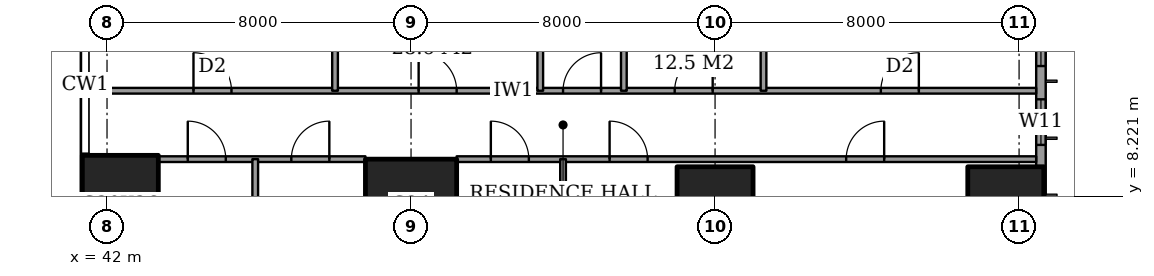
"""IFC4 building model, lengths in metres.
Left out: names, types, materials, properties, quantities, classifications, styles, units other than length and angle.
Written with IfcOpenShell. Run it as: python <this file> out.ifc"""

import sys

from ifc_helpers import new_model, si_unit, direction, frame, frame_2d, origin, origin_2d, place, context, subcontext, project, spatial, rectangle, extrude, element, fill, save


model = new_model("IFC4")
c1 = context("Model", 3, precision=1e-05, world=origin(), true_north=direction((0.0, 1.0)))
c2 = subcontext(c1, "Body", "Model", "MODEL_VIEW")
j1 = project(units=[si_unit("LENGTHUNIT", "METRE"), si_unit("PLANEANGLEUNIT", "RADIAN")], contexts=[c1])
p1 = place(None, origin())
s1 = spatial("IfcSite", under=j1, at=p1, CompositionType="ELEMENT")
p2 = place(p1, origin())
s2 = spatial("IfcBuilding", under=s1, at=p2, CompositionType="ELEMENT")
p3 = place(p2, frame((0.0, 0.0, 121.4)))
s3 = spatial("IfcBuildingStorey", under=s2, at=p3, CompositionType="ELEMENT", Elevation=121.4)
p4 = place(p3, frame((42.35, 8.0, 0.0), z_axis=(0.0, 0.0, 1.0), x_axis=(1.0, 0.0, 0.0)))
e1 = element("IfcColumn", 1, at=p4, inside=s3, PredefinedType="COLUMN", context=c2, shape_type="SweptSolid", body=[
    extrude(rectangle(XDim=2.0, YDim=2.6, at=origin_2d()), origin(), (0.0, 0.0, 1.0), 3.6),
])
p5 = place(p3, frame((50.0, 8.0, 0.0), z_axis=(0.0, 0.0, 1.0), x_axis=(1.0, 0.0, 0.0)))
e2 = element("IfcColumn", 2, at=p5, inside=s3, PredefinedType="COLUMN", context=c2, shape_type="SweptSolid", body=[
    extrude(rectangle(XDim=2.4, YDim=2.4, at=origin_2d()), origin(), (0.0, 0.0, 1.0), 3.6),
])
for number, where, z_axis, x_axis in (
    (3, (58.0, 8.0, 0.0), (0.0, 0.0, 1.0), (1.0, 0.0, 0.0)),
    (4, (65.65, 8.0, 0.0), (0.0, 0.0, 1.0), (1.0, 0.0, 0.0)),
):
    element("IfcColumn", number, at=place(p3, frame(where, z_axis=z_axis, x_axis=x_axis)), inside=s3, PredefinedType="COLUMN", context=c2, shape_type="SweptSolid", body=[
        extrude(rectangle(XDim=2.0, YDim=2.0, at=origin_2d()), origin(), (0.0, 0.0, 1.0), 3.6),
    ])
p6 = place(p3, frame((66.575, 3.175, 0.0), z_axis=(0.0, 0.0, 1.0), x_axis=(0.0, 1.0, 0.0)))
e5 = element("IfcWall", 5, at=p6, inside=s3, PredefinedType="SOLIDWALL", context=c2, shape_type="SweptSolid", body=[
    extrude(rectangle(XDim=41.65, YDim=0.25, at=frame_2d((20.825, 0.0))), origin(), (0.0, 0.0, 1.0), 3.6),
])
p7 = place(p6, frame((0.775, 0.0, 0.4)))
e6 = element("IfcOpeningElement", 6, at=p7, cuts=e5, PredefinedType="OPENING", context=c2, shape_type="SweptSolid", body=[
    extrude(rectangle(XDim=2.4, YDim=2.2, at=frame_2d((1.2, 1.1))), frame((0.0, 0.135, 0.0), z_axis=(0.0, -1.0, 0.0), x_axis=(1.0, 0.0, 0.0)), (0.0, 0.0, 1.0), 0.27),
])
p8 = place(p6, frame((6.4, 0.0, 0.4)))
e7 = element("IfcOpeningElement", 7, at=p8, cuts=e5, PredefinedType="OPENING", context=c2, shape_type="SweptSolid", body=[
    extrude(rectangle(XDim=1.2, YDim=2.2, at=frame_2d((0.6, 1.1))), frame((0.0, 0.135, 0.0), z_axis=(0.0, -1.0, 0.0), x_axis=(1.0, 0.0, 0.0)), (0.0, 0.0, 1.0), 0.27),
])
p9 = place(p6, frame((8.475, 0.0, 0.4)))
e8 = element("IfcOpeningElement", 8, at=p9, cuts=e5, PredefinedType="OPENING", context=c2, shape_type="SweptSolid", body=[
    extrude(rectangle(XDim=2.4, YDim=2.2, at=frame_2d((1.2, 1.1))), frame((0.0, 0.135, 0.0), z_axis=(0.0, -1.0, 0.0), x_axis=(1.0, 0.0, 0.0)), (0.0, 0.0, 1.0), 0.27),
])
p10 = place(p6, frame((15.775, 0.0, 0.4)))
e9 = element("IfcOpeningElement", 9, at=p10, cuts=e5, PredefinedType="OPENING", context=c2, shape_type="SweptSolid", body=[
    extrude(rectangle(XDim=2.4, YDim=2.2, at=frame_2d((1.2, 1.1))), frame((0.0, 0.135, 0.0), z_axis=(0.0, -1.0, 0.0), x_axis=(1.0, 0.0, 0.0)), (0.0, 0.0, 1.0), 0.27),
])
p11 = place(p6, frame((23.475, 0.0, 0.4)))
e10 = element("IfcOpeningElement", 10, at=p11, cuts=e5, PredefinedType="OPENING", context=c2, shape_type="SweptSolid", body=[
    extrude(rectangle(XDim=2.4, YDim=2.2, at=frame_2d((1.2, 1.1))), frame((0.0, 0.135, 0.0), z_axis=(0.0, -1.0, 0.0), x_axis=(1.0, 0.0, 0.0)), (0.0, 0.0, 1.0), 0.27),
])
p12 = place(p6, frame((30.975, 0.0, 0.4)))
e11 = element("IfcOpeningElement", 11, at=p12, cuts=e5, PredefinedType="OPENING", context=c2, shape_type="SweptSolid", body=[
    extrude(rectangle(XDim=2.4, YDim=2.2, at=frame_2d((1.2, 1.1))), frame((0.0, 0.135, 0.0), z_axis=(0.0, -1.0, 0.0), x_axis=(1.0, 0.0, 0.0)), (0.0, 0.0, 1.0), 0.27),
])
p13 = place(p6, frame((34.5, 0.0, 0.4)))
e12 = element("IfcOpeningElement", 12, at=p13, cuts=e5, PredefinedType="OPENING", context=c2, shape_type="SweptSolid", body=[
    extrude(rectangle(XDim=1.2, YDim=2.2, at=frame_2d((0.6, 1.1))), frame((0.0, 0.135, 0.0), z_axis=(0.0, -1.0, 0.0), x_axis=(1.0, 0.0, 0.0)), (0.0, 0.0, 1.0), 0.27),
])
p14 = place(p6, frame((38.475, 0.0, 0.4)))
e13 = element("IfcOpeningElement", 13, at=p14, cuts=e5, PredefinedType="OPENING", context=c2, shape_type="SweptSolid", body=[
    extrude(rectangle(XDim=2.4, YDim=2.2, at=frame_2d((1.2, 1.1))), frame((0.0, 0.135, 0.0), z_axis=(0.0, -1.0, 0.0), x_axis=(1.0, 0.0, 0.0)), (0.0, 0.0, 1.0), 0.27),
])
p15 = place(p3, frame((43.35, 9.2, 0.0), z_axis=(0.0, 0.0, 1.0), x_axis=(1.0, 0.0, 0.0)))
e14 = element("IfcWall", 14, at=p15, inside=s3, PredefinedType="PARTITIONING", context=c2, shape_type="SweptSolid", body=[
    extrude(rectangle(XDim=5.45, YDim=0.15, at=frame_2d((2.725, 0.0))), origin(), (0.0, 0.0, 1.0), 3.35),
])
p16 = place(p15, frame((3.5, 0.0, 0.0)))
e15 = element("IfcOpeningElement", 15, at=p16, cuts=e14, PredefinedType="OPENING", context=c2, shape_type="SweptSolid", body=[
    extrude(rectangle(XDim=1.0, YDim=2.1, at=frame_2d((0.5, 1.05))), frame((0.0, 0.085, 0.0), z_axis=(0.0, -1.0, 0.0), x_axis=(1.0, 0.0, 0.0)), (0.0, 0.0, 1.0), 0.17),
])
p17 = place(p15, frame((0.775, 0.0, 0.0)))
e16 = element("IfcOpeningElement", 16, at=p17, cuts=e14, PredefinedType="OPENING", context=c2, shape_type="SweptSolid", body=[
    extrude(rectangle(XDim=1.0, YDim=2.1, at=frame_2d((0.5, 1.05))), frame((0.0, 0.085, 0.0), z_axis=(0.0, -1.0, 0.0), x_axis=(1.0, 0.0, 0.0)), (0.0, 0.0, 1.0), 0.17),
])
p18 = place(p3, frame((51.2, 9.2, 0.0), z_axis=(0.0, 0.0, 1.0), x_axis=(1.0, 0.0, 0.0)))
e17 = element("IfcWall", 17, at=p18, inside=s3, PredefinedType="PARTITIONING", context=c2, shape_type="SweptSolid", body=[
    extrude(rectangle(XDim=15.25, YDim=0.15, at=frame_2d((7.625, 0.0))), origin(), (0.0, 0.0, 1.0), 3.35),
])
p19 = place(p18, frame((10.25, 0.0, 0.0)))
e18 = element("IfcOpeningElement", 18, at=p19, cuts=e17, PredefinedType="OPENING", context=c2, shape_type="SweptSolid", body=[
    extrude(rectangle(XDim=1.0, YDim=2.1, at=frame_2d((0.5, 1.05))), frame((0.0, 0.085, 0.0), z_axis=(0.0, -1.0, 0.0), x_axis=(1.0, 0.0, 0.0)), (0.0, 0.0, 1.0), 0.17),
])
p20 = place(p18, frame((4.025, 0.0, 0.0)))
e19 = element("IfcOpeningElement", 19, at=p20, cuts=e17, PredefinedType="OPENING", context=c2, shape_type="SweptSolid", body=[
    extrude(rectangle(XDim=1.0, YDim=2.1, at=frame_2d((0.5, 1.05))), frame((0.0, 0.085, 0.0), z_axis=(0.0, -1.0, 0.0), x_axis=(1.0, 0.0, 0.0)), (0.0, 0.0, 1.0), 0.17),
])
p21 = place(p18, frame((0.9, 0.0, 0.0)))
e20 = element("IfcOpeningElement", 20, at=p21, cuts=e17, PredefinedType="OPENING", context=c2, shape_type="SweptSolid", body=[
    extrude(rectangle(XDim=1.0, YDim=2.1, at=frame_2d((0.5, 1.05))), frame((0.0, 0.085, 0.0), z_axis=(0.0, -1.0, 0.0), x_axis=(1.0, 0.0, 0.0)), (0.0, 0.0, 1.0), 0.17),
])
p22 = place(p3, frame((41.439, 11.0, 0.0), z_axis=(0.0, 0.0, 1.0), x_axis=(1.0, 0.0, 0.0)))
e21 = element("IfcWall", 21, at=p22, inside=s3, PredefinedType="PARTITIONING", context=c2, shape_type="SweptSolid", body=[
    extrude(rectangle(XDim=25.011, YDim=0.15, at=frame_2d((12.505, 0.0))), origin(), (0.0, 0.0, 1.0), 3.35),
])
p23 = place(p22, frame((12.561, 0.0, 0.0)))
e22 = element("IfcOpeningElement", 22, at=p23, cuts=e21, PredefinedType="OPENING", context=c2, shape_type="SweptSolid", body=[
    extrude(rectangle(XDim=1.0, YDim=2.1, at=frame_2d((0.5, 1.05))), frame((0.0, 0.085, 0.0), z_axis=(0.0, -1.0, 0.0), x_axis=(1.0, 0.0, 0.0)), (0.0, 0.0, 1.0), 0.17),
])
p24 = place(p22, frame((20.924, 0.0, 0.0)))
e23 = element("IfcOpeningElement", 23, at=p24, cuts=e21, PredefinedType="OPENING", context=c2, shape_type="SweptSolid", body=[
    extrude(rectangle(XDim=1.0, YDim=2.1, at=frame_2d((0.5, 1.05))), frame((0.0, 0.085, 0.0), z_axis=(0.0, -1.0, 0.0), x_axis=(1.0, 0.0, 0.0)), (0.0, 0.0, 1.0), 0.17),
])
p25 = place(p22, frame((15.499, 0.0, 0.0)))
e24 = element("IfcOpeningElement", 24, at=p25, cuts=e21, PredefinedType="OPENING", context=c2, shape_type="SweptSolid", body=[
    extrude(rectangle(XDim=1.0, YDim=2.1, at=frame_2d((0.5, 1.05))), frame((0.0, 0.085, 0.0), z_axis=(0.0, -1.0, 0.0), x_axis=(1.0, 0.0, 0.0)), (0.0, 0.0, 1.0), 0.17),
])
p26 = place(p22, frame((8.761, 0.0, 0.0)))
e25 = element("IfcOpeningElement", 25, at=p26, cuts=e21, PredefinedType="OPENING", context=c2, shape_type="SweptSolid", body=[
    extrude(rectangle(XDim=1.0, YDim=2.1, at=frame_2d((0.5, 1.05))), frame((0.0, 0.085, 0.0), z_axis=(0.0, -1.0, 0.0), x_axis=(1.0, 0.0, 0.0)), (0.0, 0.0, 1.0), 0.17),
])
p27 = place(p22, frame((2.836, 0.0, 0.0)))
e26 = element("IfcOpeningElement", 26, at=p27, cuts=e21, PredefinedType="OPENING", context=c2, shape_type="SweptSolid", body=[
    extrude(rectangle(XDim=1.0, YDim=2.1, at=frame_2d((0.5, 1.05))), frame((0.0, 0.085, 0.0), z_axis=(0.0, -1.0, 0.0), x_axis=(1.0, 0.0, 0.0)), (0.0, 0.0, 1.0), 0.17),
])
p28 = place(p3, frame((45.9, -0.45, 0.0), z_axis=(0.0, 0.0, 1.0), x_axis=(0.0, 1.0, 0.0)))
e27 = element("IfcWall", 27, at=p28, inside=s3, PredefinedType="PARTITIONING", context=c2, shape_type="SweptSolid", body=[
    extrude(rectangle(XDim=9.65, YDim=0.15, at=frame_2d((4.825, 0.0))), origin(), (0.0, 0.0, 1.0), 3.35),
])
for number, where, z_axis, x_axis in (
    (28, (48.0, 11.0, 0.0), (0.0, 0.0, 1.0), (0.0, 1.0, 0.0)),
    (29, (53.4, 11.0, 0.0), (0.0, 0.0, 1.0), (0.0, 1.0, 0.0)),
):
    element("IfcWall", number, at=place(p3, frame(where, z_axis=z_axis, x_axis=x_axis)), inside=s3, PredefinedType="PARTITIONING", context=c2, shape_type="SweptSolid", body=[
        extrude(rectangle(XDim=6.0, YDim=0.15, at=frame_2d((3.0, 0.0))), origin(), (0.0, 0.0, 1.0), 3.35),
    ])
p29 = place(p3, frame((54.0, -0.45, 0.0), z_axis=(0.0, 0.0, 1.0), x_axis=(0.0, 1.0, 0.0)))
e30 = element("IfcWall", 30, at=p29, inside=s3, PredefinedType="PARTITIONING", context=c2, shape_type="SweptSolid", body=[
    extrude(rectangle(XDim=9.65, YDim=0.15, at=frame_2d((4.825, 0.0))), origin(), (0.0, 0.0, 1.0), 3.35),
])
p30 = place(p3, frame((55.6, 11.0, 0.0), z_axis=(0.0, 0.0, 1.0), x_axis=(0.0, 1.0, 0.0)))
e31 = element("IfcWall", 31, at=p30, inside=s3, PredefinedType="PARTITIONING", context=c2, shape_type="SweptSolid", body=[
    extrude(rectangle(XDim=10.6, YDim=0.15, at=frame_2d((5.3, 0.0))), origin(), (0.0, 0.0, 1.0), 3.35),
])
p31 = place(p30, frame((7.8, 0.0, 0.0)))
e32 = element("IfcOpeningElement", 32, at=p31, cuts=e31, PredefinedType="OPENING", context=c2, shape_type="SweptSolid", body=[
    extrude(rectangle(XDim=1.0, YDim=2.1, at=frame_2d((0.5, 1.05))), frame((0.0, 0.085, 0.0), z_axis=(0.0, -1.0, 0.0), x_axis=(1.0, 0.0, 0.0)), (0.0, 0.0, 1.0), 0.17),
])
p32 = place(p3, frame((59.275, 11.0, 0.0), z_axis=(0.0, 0.0, 1.0), x_axis=(0.0, 1.0, 0.0)))
e33 = element("IfcWall", 33, at=p32, inside=s3, PredefinedType="PARTITIONING", context=c2, shape_type="SweptSolid", body=[
    extrude(rectangle(XDim=3.8, YDim=0.15, at=frame_2d((1.9, 0.0))), origin(), (0.0, 0.0, 1.0), 3.35),
])
p33 = place(p8, origin())
e34 = element("IfcWindow", 34, at=p33, inside=s3, PartitioningType="SINGLE_PANEL", PredefinedType="WINDOW", context=c2, shape_type="SweptSolid", body=[
    extrude(rectangle(XDim=1.2, YDim=2.2, at=frame_2d((0.6, 1.1))), frame((0.0, 0.03, 0.0), z_axis=(0.0, -1.0, 0.0), x_axis=(1.0, 0.0, 0.0)), (0.0, 0.0, 1.0), 0.06),
])
fill(e7, e34)
p34 = place(p9, origin())
e35 = element("IfcWindow", 35, at=p34, inside=s3, PartitioningType="SINGLE_PANEL", PredefinedType="WINDOW", context=c2, shape_type="SweptSolid", body=[
    extrude(rectangle(XDim=2.4, YDim=2.2, at=frame_2d((1.2, 1.1))), frame((0.0, 0.03, 0.0), z_axis=(0.0, -1.0, 0.0), x_axis=(1.0, 0.0, 0.0)), (0.0, 0.0, 1.0), 0.06),
])
fill(e8, e35)
p35 = place(p19, origin())
e36 = element("IfcDoor", 36, at=p35, inside=s3, OperationType="SINGLE_SWING_LEFT", PredefinedType="DOOR", context=c2, shape_type="SweptSolid", body=[
    extrude(rectangle(XDim=1.0, YDim=2.1, at=frame_2d((0.5, 1.05))), frame((0.0, 0.025, 0.0), z_axis=(0.0, -1.0, 0.0), x_axis=(1.0, 0.0, 0.0)), (0.0, 0.0, 1.0), 0.05),
])
fill(e18, e36)
p36 = place(p20, origin())
e37 = element("IfcDoor", 37, at=p36, inside=s3, OperationType="SINGLE_SWING_RIGHT", PredefinedType="DOOR", context=c2, shape_type="SweptSolid", body=[
    extrude(rectangle(XDim=1.0, YDim=2.1, at=frame_2d((0.5, 1.05))), frame((0.0, 0.025, 0.0), z_axis=(0.0, -1.0, 0.0), x_axis=(1.0, 0.0, 0.0)), (0.0, 0.0, 1.0), 0.05),
])
fill(e19, e37)
p37 = place(p21, origin())
e38 = element("IfcDoor", 38, at=p37, inside=s3, OperationType="SINGLE_SWING_RIGHT", PredefinedType="DOOR", context=c2, shape_type="SweptSolid", body=[
    extrude(rectangle(XDim=1.0, YDim=2.1, at=frame_2d((0.5, 1.05))), frame((0.0, 0.025, 0.0), z_axis=(0.0, -1.0, 0.0), x_axis=(1.0, 0.0, 0.0)), (0.0, 0.0, 1.0), 0.05),
])
fill(e20, e38)
p38 = place(p16, origin())
e39 = element("IfcDoor", 39, at=p38, inside=s3, OperationType="SINGLE_SWING_LEFT", PredefinedType="DOOR", context=c2, shape_type="SweptSolid", body=[
    extrude(rectangle(XDim=1.0, YDim=2.1, at=frame_2d((0.5, 1.05))), frame((0.0, 0.025, 0.0), z_axis=(0.0, -1.0, 0.0), x_axis=(1.0, 0.0, 0.0)), (0.0, 0.0, 1.0), 0.05),
])
fill(e15, e39)
p39 = place(p17, origin())
e40 = element("IfcDoor", 40, at=p39, inside=s3, OperationType="SINGLE_SWING_RIGHT", PredefinedType="DOOR", context=c2, shape_type="SweptSolid", body=[
    extrude(rectangle(XDim=1.0, YDim=2.1, at=frame_2d((0.5, 1.05))), frame((0.0, 0.025, 0.0), z_axis=(0.0, -1.0, 0.0), x_axis=(1.0, 0.0, 0.0)), (0.0, 0.0, 1.0), 0.05),
])
fill(e16, e40)
p40 = place(p23, origin())
e41 = element("IfcDoor", 41, at=p40, inside=s3, OperationType="SINGLE_SWING_LEFT", PredefinedType="DOOR", context=c2, shape_type="SweptSolid", body=[
    extrude(rectangle(XDim=1.0, YDim=2.1, at=frame_2d((0.5, 1.05))), frame((0.0, 0.025, 0.0), z_axis=(0.0, -1.0, 0.0), x_axis=(1.0, 0.0, 0.0)), (0.0, 0.0, 1.0), 0.05),
])
fill(e22, e41)
p41 = place(p24, origin())
e42 = element("IfcDoor", 42, at=p41, inside=s3, OperationType="SINGLE_SWING_LEFT", PredefinedType="DOOR", context=c2, shape_type="SweptSolid", body=[
    extrude(rectangle(XDim=1.0, YDim=2.1, at=frame_2d((0.5, 1.05))), frame((0.0, 0.025, 0.0), z_axis=(0.0, -1.0, 0.0), x_axis=(1.0, 0.0, 0.0)), (0.0, 0.0, 1.0), 0.05),
])
fill(e23, e42)
p42 = place(p25, origin())
e43 = element("IfcDoor", 43, at=p42, inside=s3, OperationType="SINGLE_SWING_LEFT", PredefinedType="DOOR", context=c2, shape_type="SweptSolid", body=[
    extrude(rectangle(XDim=1.0, YDim=2.1, at=frame_2d((0.5, 1.05))), frame((0.0, 0.025, 0.0), z_axis=(0.0, -1.0, 0.0), x_axis=(1.0, 0.0, 0.0)), (0.0, 0.0, 1.0), 0.05),
])
fill(e24, e43)
p43 = place(p26, origin())
e44 = element("IfcDoor", 44, at=p43, inside=s3, OperationType="SINGLE_SWING_RIGHT", PredefinedType="DOOR", context=c2, shape_type="SweptSolid", body=[
    extrude(rectangle(XDim=1.0, YDim=2.1, at=frame_2d((0.5, 1.05))), frame((0.0, 0.025, 0.0), z_axis=(0.0, -1.0, 0.0), x_axis=(1.0, 0.0, 0.0)), (0.0, 0.0, 1.0), 0.05),
])
fill(e25, e44)
p44 = place(p27, origin())
e45 = element("IfcDoor", 45, at=p44, inside=s3, OperationType="SINGLE_SWING_RIGHT", PredefinedType="DOOR", context=c2, shape_type="SweptSolid", body=[
    extrude(rectangle(XDim=1.0, YDim=2.1, at=frame_2d((0.5, 1.05))), frame((0.0, 0.025, 0.0), z_axis=(0.0, -1.0, 0.0), x_axis=(1.0, 0.0, 0.0)), (0.0, 0.0, 1.0), 0.05),
])
fill(e26, e45)
save(model, sys.argv[1])
